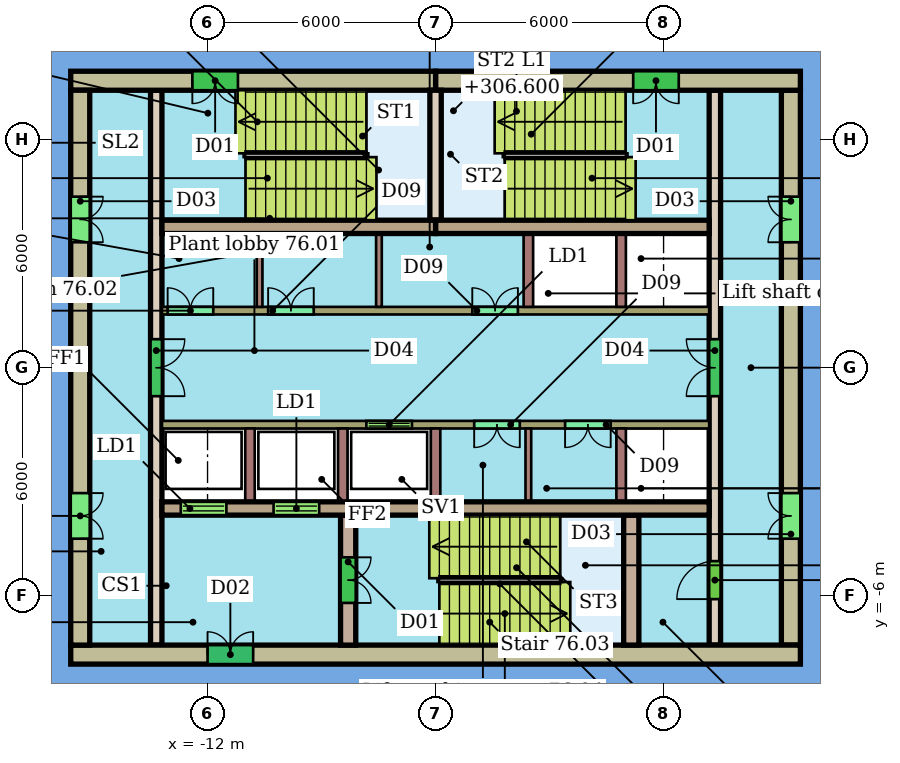
"""IFC4 building model, lengths in metres.
Left out: names, types, materials, properties, quantities, classifications, styles, units other than length and angle.
Written with IfcOpenShell. Run it as: python <this file> out.ifc"""

import sys

from ifc_helpers import new_model, si_unit, direction, frame, frame_2d, origin, place, context, subcontext, project, spatial, rectangle, extrude, element, fill, save


model = new_model("IFC4")
c1 = context("Model", 3, precision=1e-05, world=origin(), true_north=direction((0.0, 1.0)))
c2 = subcontext(c1, "Body", "Model", "MODEL_VIEW")
j1 = project(units=[si_unit("LENGTHUNIT", "METRE"), si_unit("PLANEANGLEUNIT", "RADIAN")], contexts=[c1])
p1 = place(None, origin())
s1 = spatial("IfcSite", under=j1, at=p1, CompositionType="ELEMENT")
p2 = place(p1, origin())
s2 = spatial("IfcBuilding", under=s1, at=p2, CompositionType="ELEMENT")
p3 = place(p2, frame((0.0, 0.0, 304.5)))
s3 = spatial("IfcBuildingStorey", under=s2, at=p3, CompositionType="ELEMENT", Elevation=304.5)
p4 = place(p3, frame((3.6, 7.55, 0.0), z_axis=(0.0, 0.0, 1.0), x_axis=(-1.0, 0.0, 0.0)))
e1 = element("IfcWall", 1, at=p4, inside=s3, PredefinedType="SHEAR", context=c2, shape_type="SweptSolid", body=[
    extrude(rectangle(XDim=9.6, YDim=0.5, at=frame_2d((4.8, 0.0))), origin(), (0.0, 0.0, 1.0), 3.9),
])
p5 = place(p4, frame((3.2, 0.0, 0.0)))
e2 = element("IfcOpeningElement", 2, at=p5, cuts=e1, PredefinedType="OPENING", context=c2, shape_type="SweptSolid", body=[
    extrude(rectangle(XDim=1.2, YDim=2.1, at=frame_2d((0.6, 1.05))), frame((0.0, 0.26, 0.0), z_axis=(0.0, -1.0, 0.0), x_axis=(1.0, 0.0, 0.0)), (0.0, 0.0, 1.0), 0.52),
])
p6 = place(p3, frame((-6.0, 7.55, 0.0), z_axis=(0.0, 0.0, 1.0), x_axis=(-1.0, 0.0, 0.0)))
e3 = element("IfcWall", 3, at=p6, inside=s3, PredefinedType="SHEAR", context=c2, shape_type="SweptSolid", body=[
    extrude(rectangle(XDim=9.6, YDim=0.5, at=frame_2d((4.8, 0.0))), origin(), (0.0, 0.0, 1.0), 3.9),
])
p7 = place(p6, frame((5.2, 0.0, 0.0)))
e4 = element("IfcOpeningElement", 4, at=p7, cuts=e3, PredefinedType="OPENING", context=c2, shape_type="SweptSolid", body=[
    extrude(rectangle(XDim=1.2, YDim=2.1, at=frame_2d((0.6, 1.05))), frame((0.0, 0.26, 0.0), z_axis=(0.0, -1.0, 0.0), x_axis=(1.0, 0.0, 0.0)), (0.0, 0.0, 1.0), 0.52),
])
p8 = place(p3, frame((-15.6, -7.55, 0.0), z_axis=(0.0, 0.0, 1.0), x_axis=(1.0, 0.0, 0.0)))
e5 = element("IfcWall", 5, at=p8, inside=s3, PredefinedType="SHEAR", context=c2, shape_type="SweptSolid", body=[
    extrude(rectangle(XDim=19.2, YDim=0.5, at=frame_2d((9.6, 0.0))), origin(), (0.0, 0.0, 1.0), 3.9),
])
p9 = place(p8, frame((3.6, 0.0, 0.0)))
e6 = element("IfcOpeningElement", 6, at=p9, cuts=e5, PredefinedType="OPENING", context=c2, shape_type="SweptSolid", body=[
    extrude(rectangle(XDim=1.2, YDim=2.1, at=frame_2d((0.6, 1.05))), frame((0.0, 0.26, 0.0), z_axis=(0.0, -1.0, 0.0), x_axis=(1.0, 0.0, 0.0)), (0.0, 0.0, 1.0), 0.52),
])
p10 = place(p3, frame((-15.35, 7.3, 0.0), z_axis=(0.0, 0.0, 1.0), x_axis=(0.0, -1.0, 0.0)))
e7 = element("IfcWall", 7, at=p10, inside=s3, PredefinedType="SHEAR", context=c2, shape_type="SweptSolid", body=[
    extrude(rectangle(XDim=14.6, YDim=0.5, at=frame_2d((7.3, 0.0))), origin(), (0.0, 0.0, 1.0), 3.9),
])
p11 = place(p10, frame((10.6, 0.0, 0.0)))
e8 = element("IfcOpeningElement", 8, at=p11, cuts=e7, PredefinedType="OPENING", context=c2, shape_type="SweptSolid", body=[
    extrude(rectangle(XDim=1.2, YDim=2.1, at=frame_2d((0.6, 1.05))), frame((0.0, 0.26, 0.0), z_axis=(0.0, -1.0, 0.0), x_axis=(1.0, 0.0, 0.0)), (0.0, 0.0, 1.0), 0.52),
])
p12 = place(p10, frame((2.8, 0.0, 0.0)))
e9 = element("IfcOpeningElement", 9, at=p12, cuts=e7, PredefinedType="OPENING", context=c2, shape_type="SweptSolid", body=[
    extrude(rectangle(XDim=1.2, YDim=2.1, at=frame_2d((0.6, 1.05))), frame((0.0, 0.26, 0.0), z_axis=(0.0, -1.0, 0.0), x_axis=(1.0, 0.0, 0.0)), (0.0, 0.0, 1.0), 0.52),
])
p13 = place(p3, frame((3.35, -7.3, 0.0), z_axis=(0.0, 0.0, 1.0), x_axis=(0.0, 1.0, 0.0)))
e10 = element("IfcWall", 10, at=p13, inside=s3, PredefinedType="SHEAR", context=c2, shape_type="SweptSolid", body=[
    extrude(rectangle(XDim=14.6, YDim=0.5, at=frame_2d((7.3, 0.0))), origin(), (0.0, 0.0, 1.0), 3.9),
])
p14 = place(p13, frame((2.8, 0.0, 0.0)))
e11 = element("IfcOpeningElement", 11, at=p14, cuts=e10, PredefinedType="OPENING", context=c2, shape_type="SweptSolid", body=[
    extrude(rectangle(XDim=1.2, YDim=2.1, at=frame_2d((0.6, 1.05))), frame((0.0, 0.26, 0.0), z_axis=(0.0, -1.0, 0.0), x_axis=(1.0, 0.0, 0.0)), (0.0, 0.0, 1.0), 0.52),
])
p15 = place(p13, frame((10.6, 0.0, 0.0)))
e12 = element("IfcOpeningElement", 12, at=p15, cuts=e10, PredefinedType="OPENING", context=c2, shape_type="SweptSolid", body=[
    extrude(rectangle(XDim=1.2, YDim=2.1, at=frame_2d((0.6, 1.05))), frame((0.0, 0.26, 0.0), z_axis=(0.0, -1.0, 0.0), x_axis=(1.0, 0.0, 0.0)), (0.0, 0.0, 1.0), 0.52),
])
for number, where, z_axis, x_axis in (
    (13, (-13.2, 3.705, 0.0), (0.0, 0.0, 1.0), (1.0, 0.0, 0.0)),
    (14, (-6.0, 3.705, 0.0), (0.0, 0.0, 1.0), (1.0, 0.0, 0.0)),
):
    element("IfcWall", number, at=place(p3, frame(where, z_axis=z_axis, x_axis=x_axis)), inside=s3, PredefinedType="SHEAR", context=c2, shape_type="SweptSolid", body=[
        extrude(rectangle(XDim=7.2, YDim=0.35, at=frame_2d((3.6, 0.0))), origin(), (0.0, 0.0, 1.0), 3.9),
    ])
p16 = place(p3, frame((-13.2, -3.705, 0.0), z_axis=(0.0, 0.0, 1.0), x_axis=(1.0, 0.0, 0.0)))
e15 = element("IfcWall", 15, at=p16, inside=s3, PredefinedType="SHEAR", context=c2, shape_type="SweptSolid", body=[
    extrude(rectangle(XDim=7.2, YDim=0.35, at=frame_2d((3.6, 0.0))), origin(), (0.0, 0.0, 1.0), 3.9),
])
p17 = place(p16, frame((0.496, 0.0, 0.0)))
e16 = element("IfcOpeningElement", 16, at=p17, cuts=e15, PredefinedType="OPENING", context=c2, shape_type="SweptSolid", body=[
    extrude(rectangle(XDim=1.2, YDim=2.1, at=frame_2d((0.6, 1.05))), frame((0.0, 0.185, 0.0), z_axis=(0.0, -1.0, 0.0), x_axis=(1.0, 0.0, 0.0)), (0.0, 0.0, 1.0), 0.37),
])
p18 = place(p16, frame((2.938, 0.0, 0.0)))
e17 = element("IfcOpeningElement", 17, at=p18, cuts=e15, PredefinedType="OPENING", context=c2, shape_type="SweptSolid", body=[
    extrude(rectangle(XDim=1.2, YDim=2.1, at=frame_2d((0.6, 1.05))), frame((0.0, 0.185, 0.0), z_axis=(0.0, -1.0, 0.0), x_axis=(1.0, 0.0, 0.0)), (0.0, 0.0, 1.0), 0.37),
])
p19 = place(p3, frame((-6.0, -3.705, 0.0), z_axis=(0.0, 0.0, 1.0), x_axis=(1.0, 0.0, 0.0)))
e18 = element("IfcWall", 18, at=p19, inside=s3, PredefinedType="SHEAR", context=c2, shape_type="SweptSolid", body=[
    extrude(rectangle(XDim=7.2, YDim=0.35, at=frame_2d((3.6, 0.0))), origin(), (0.0, 0.0, 1.0), 3.9),
])
p20 = place(p3, frame((-13.35, 7.3, 0.0), z_axis=(0.0, 0.0, 1.0), x_axis=(0.0, -1.0, 0.0)))
e19 = element("IfcWall", 19, at=p20, inside=s3, PredefinedType="SHEAR", context=c2, shape_type="SweptSolid", body=[
    extrude(rectangle(XDim=14.6, YDim=0.3, at=frame_2d((7.3, 0.0))), origin(), (0.0, 0.0, 1.0), 3.9),
])
p21 = place(p20, frame((6.55, 0.0, 0.0)))
e20 = element("IfcOpeningElement", 20, at=p21, cuts=e19, PredefinedType="OPENING", context=c2, shape_type="SweptSolid", body=[
    extrude(rectangle(XDim=1.5, YDim=2.1, at=frame_2d((0.75, 1.05))), frame((0.0, 0.16, 0.0), z_axis=(0.0, -1.0, 0.0), x_axis=(1.0, 0.0, 0.0)), (0.0, 0.0, 1.0), 0.32),
])
p22 = place(p3, frame((1.35, -7.3, 0.0), z_axis=(0.0, 0.0, 1.0), x_axis=(0.0, 1.0, 0.0)))
e21 = element("IfcWall", 21, at=p22, inside=s3, PredefinedType="SHEAR", context=c2, shape_type="SweptSolid", body=[
    extrude(rectangle(XDim=14.6, YDim=0.3, at=frame_2d((7.3, 0.0))), origin(), (0.0, 0.0, 1.0), 3.9),
])
p23 = place(p22, frame((1.21, 0.0, 0.0)))
e22 = element("IfcOpeningElement", 22, at=p23, cuts=e21, PredefinedType="OPENING", context=c2, shape_type="SweptSolid", body=[
    extrude(rectangle(XDim=1.0, YDim=2.1, at=frame_2d((0.5, 1.05))), frame((0.0, 0.16, 0.0), z_axis=(0.0, -1.0, 0.0), x_axis=(1.0, 0.0, 0.0)), (0.0, 0.0, 1.0), 0.32),
])
p24 = place(p22, frame((6.55, 0.0, 0.0)))
e23 = element("IfcOpeningElement", 23, at=p24, cuts=e21, PredefinedType="OPENING", context=c2, shape_type="SweptSolid", body=[
    extrude(rectangle(XDim=1.5, YDim=2.1, at=frame_2d((0.75, 1.05))), frame((0.0, 0.16, 0.0), z_axis=(0.0, -1.0, 0.0), x_axis=(1.0, 0.0, 0.0)), (0.0, 0.0, 1.0), 0.32),
])
p25 = place(p3, frame((-13.2, 1.5, 0.0), z_axis=(0.0, 0.0, 1.0), x_axis=(1.0, 0.0, 0.0)))
e24 = element("IfcWall", 24, at=p25, inside=s3, PredefinedType="SHEAR", context=c2, shape_type="SweptSolid", body=[
    extrude(rectangle(XDim=14.4, YDim=0.2, at=frame_2d((7.2, 0.0))), origin(), (0.0, 0.0, 1.0), 3.9),
])
p26 = place(p25, frame((0.15, 0.0, 0.0)))
e25 = element("IfcOpeningElement", 25, at=p26, cuts=e24, PredefinedType="OPENING", context=c2, shape_type="SweptSolid", body=[
    extrude(rectangle(XDim=1.2, YDim=2.4, at=frame_2d((0.6, 1.2))), frame((0.0, 0.11, 0.0), z_axis=(0.0, -1.0, 0.0), x_axis=(1.0, 0.0, 0.0)), (0.0, 0.0, 1.0), 0.22),
])
p27 = place(p25, frame((2.794, 0.0, 0.0)))
e26 = element("IfcOpeningElement", 26, at=p27, cuts=e24, PredefinedType="OPENING", context=c2, shape_type="SweptSolid", body=[
    extrude(rectangle(XDim=1.2, YDim=2.4, at=frame_2d((0.6, 1.2))), frame((0.0, 0.11, 0.0), z_axis=(0.0, -1.0, 0.0), x_axis=(1.0, 0.0, 0.0)), (0.0, 0.0, 1.0), 0.22),
])
p28 = place(p25, frame((8.167, 0.0, 0.0)))
e27 = element("IfcOpeningElement", 27, at=p28, cuts=e24, PredefinedType="OPENING", context=c2, shape_type="SweptSolid", body=[
    extrude(rectangle(XDim=1.2, YDim=2.4, at=frame_2d((0.6, 1.2))), frame((0.0, 0.11, 0.0), z_axis=(0.0, -1.0, 0.0), x_axis=(1.0, 0.0, 0.0)), (0.0, 0.0, 1.0), 0.22),
])
p29 = place(p3, frame((1.2, -1.5, 0.0), z_axis=(0.0, 0.0, 1.0), x_axis=(-1.0, 0.0, 0.0)))
e28 = element("IfcWall", 28, at=p29, inside=s3, PredefinedType="SHEAR", context=c2, shape_type="SweptSolid", body=[
    extrude(rectangle(XDim=14.4, YDim=0.2, at=frame_2d((7.2, 0.0))), origin(), (0.0, 0.0, 1.0), 3.9),
])
p30 = place(p29, frame((7.821, 0.0, 0.0)))
e29 = element("IfcOpeningElement", 29, at=p30, cuts=e28, PredefinedType="OPENING", context=c2, shape_type="SweptSolid", body=[
    extrude(rectangle(XDim=1.2, YDim=2.1, at=frame_2d((0.6, 1.05))), frame((0.0, 0.11, 0.0), z_axis=(0.0, -1.0, 0.0), x_axis=(1.0, 0.0, 0.0)), (0.0, 0.0, 1.0), 0.22),
])
p31 = place(p29, frame((4.983, 0.0, 0.0)))
e30 = element("IfcOpeningElement", 30, at=p31, cuts=e28, PredefinedType="OPENING", context=c2, shape_type="SweptSolid", body=[
    extrude(rectangle(XDim=1.2, YDim=2.4, at=frame_2d((0.6, 1.2))), frame((0.0, 0.11, 0.0), z_axis=(0.0, -1.0, 0.0), x_axis=(1.0, 0.0, 0.0)), (0.0, 0.0, 1.0), 0.22),
])
p32 = place(p29, frame((2.592, 0.0, 0.0)))
e31 = element("IfcOpeningElement", 31, at=p32, cuts=e28, PredefinedType="OPENING", context=c2, shape_type="SweptSolid", body=[
    extrude(rectangle(XDim=1.2, YDim=2.4, at=frame_2d((0.6, 1.2))), frame((0.0, 0.11, 0.0), z_axis=(0.0, -1.0, 0.0), x_axis=(1.0, 0.0, 0.0)), (0.0, 0.0, 1.0), 0.22),
])
p33 = place(p3, frame((-8.3, -3.88, 0.0), z_axis=(0.0, 0.0, 1.0), x_axis=(0.0, -1.0, 0.0)))
e32 = element("IfcWall", 32, at=p33, inside=s3, PredefinedType="SHEAR", context=c2, shape_type="SweptSolid", body=[
    extrude(rectangle(XDim=3.42, YDim=0.4, at=frame_2d((1.71, 0.0))), origin(), (0.0, 0.0, 1.0), 3.9),
])
p34 = place(p33, frame((1.11, 0.0, 0.0)))
e33 = element("IfcOpeningElement", 33, at=p34, cuts=e32, PredefinedType="OPENING", context=c2, shape_type="SweptSolid", body=[
    extrude(rectangle(XDim=1.2, YDim=2.1, at=frame_2d((0.6, 1.05))), frame((0.0, 0.21, 0.0), z_axis=(0.0, -1.0, 0.0), x_axis=(1.0, 0.0, 0.0)), (0.0, 0.0, 1.0), 0.42),
])
p35 = place(p3, frame((-0.85, -3.88, 0.0), z_axis=(0.0, 0.0, 1.0), x_axis=(0.0, -1.0, 0.0)))
e34 = element("IfcWall", 34, at=p35, inside=s3, PredefinedType="SHEAR", context=c2, shape_type="SweptSolid", body=[
    extrude(rectangle(XDim=3.42, YDim=0.4, at=frame_2d((1.71, 0.0))), origin(), (0.0, 0.0, 1.0), 3.9),
])
p36 = place(p3, frame((-6.0, 3.88, 0.0), z_axis=(0.0, 0.0, 1.0), x_axis=(0.0, 1.0, 0.0)))
e35 = element("IfcWall", 35, at=p36, inside=s3, PredefinedType="SHEAR", context=c2, shape_type="SweptSolid", body=[
    extrude(rectangle(XDim=3.42, YDim=0.3, at=frame_2d((1.71, 0.0))), origin(), (0.0, 0.0, 1.0), 3.9),
])
for number, where, z_axis, x_axis in (
    (36, (-3.558, 1.6, 0.0), (0.0, 0.0, 1.0), (0.0, 1.0, 0.0)),
    (37, (-1.117, 1.6, 0.0), (0.0, 0.0, 1.0), (0.0, 1.0, 0.0)),
):
    element("IfcWall", number, at=place(p3, frame(where, z_axis=z_axis, x_axis=x_axis)), inside=s3, PredefinedType="SHEAR", context=c2, shape_type="SweptSolid", body=[
        extrude(rectangle(XDim=1.93, YDim=0.25, at=frame_2d((0.965, 0.0))), origin(), (0.0, 0.0, 1.0), 3.9),
    ])
for number, where, z_axis, x_axis in (
    (38, (-10.631, 1.6, 0.0), (0.0, 0.0, 1.0), (0.0, 1.0, 0.0)),
    (39, (-7.49, 1.6, 0.0), (0.0, 0.0, 1.0), (0.0, 1.0, 0.0)),
):
    element("IfcWall", number, at=place(p3, frame(where, z_axis=z_axis, x_axis=x_axis)), inside=s3, PredefinedType="PARTITIONING", context=c2, shape_type="SweptSolid", body=[
        extrude(rectangle(XDim=1.93, YDim=0.15, at=frame_2d((0.965, 0.0))), origin(), (0.0, 0.0, 1.0), 3.9),
    ])
for number, where, z_axis, x_axis in (
    (40, (-10.883, -1.6, 0.0), (0.0, 0.0, 1.0), (0.0, -1.0, 0.0)),
    (41, (-8.442, -1.6, 0.0), (0.0, 0.0, 1.0), (0.0, -1.0, 0.0)),
    (42, (-6.0, -1.6, 0.0), (0.0, 0.0, 1.0), (0.0, -1.0, 0.0)),
    (43, (-1.117, -1.6, 0.0), (0.0, 0.0, 1.0), (0.0, -1.0, 0.0)),
):
    element("IfcWall", number, at=place(p3, frame(where, z_axis=z_axis, x_axis=x_axis)), inside=s3, PredefinedType="SHEAR", context=c2, shape_type="SweptSolid", body=[
        extrude(rectangle(XDim=1.93, YDim=0.25, at=frame_2d((0.965, 0.0))), origin(), (0.0, 0.0, 1.0), 3.9),
    ])
p37 = place(p3, frame((-3.558, -1.6, 0.0), z_axis=(0.0, 0.0, 1.0), x_axis=(0.0, -1.0, 0.0)))
e44 = element("IfcWall", 44, at=p37, inside=s3, PredefinedType="PARTITIONING", context=c2, shape_type="SweptSolid", body=[
    extrude(rectangle(XDim=1.93, YDim=0.15, at=frame_2d((0.965, 0.0))), origin(), (0.0, 0.0, 1.0), 3.9),
])
p38 = place(p5, origin())
e45 = element("IfcDoor", 45, at=p38, inside=s3, OperationType="DOUBLE_DOOR_SINGLE_SWING", PredefinedType="NOTDEFINED", context=c2, shape_type="SweptSolid", body=[
    extrude(rectangle(XDim=1.2, YDim=2.1, at=frame_2d((0.6, 1.05))), frame((0.0, 0.025, 0.0), z_axis=(0.0, -1.0, 0.0), x_axis=(1.0, 0.0, 0.0)), (0.0, 0.0, 1.0), 0.05),
])
fill(e2, e45)
p39 = place(p7, origin())
e46 = element("IfcDoor", 46, at=p39, inside=s3, OperationType="DOUBLE_DOOR_SINGLE_SWING", PredefinedType="NOTDEFINED", context=c2, shape_type="SweptSolid", body=[
    extrude(rectangle(XDim=1.2, YDim=2.1, at=frame_2d((0.6, 1.05))), frame((0.0, 0.025, 0.0), z_axis=(0.0, -1.0, 0.0), x_axis=(1.0, 0.0, 0.0)), (0.0, 0.0, 1.0), 0.05),
])
fill(e4, e46)
p40 = place(p9, origin())
e47 = element("IfcDoor", 47, at=p40, inside=s3, OperationType="DOUBLE_DOOR_SINGLE_SWING", PredefinedType="NOTDEFINED", context=c2, shape_type="SweptSolid", body=[
    extrude(rectangle(XDim=1.2, YDim=2.1, at=frame_2d((0.6, 1.05))), frame((0.0, 0.025, 0.0), z_axis=(0.0, -1.0, 0.0), x_axis=(1.0, 0.0, 0.0)), (0.0, 0.0, 1.0), 0.05),
])
fill(e6, e47)
p41 = place(p11, origin())
e48 = element("IfcDoor", 48, at=p41, inside=s3, OperationType="DOUBLE_DOOR_SINGLE_SWING", PredefinedType="NOTDEFINED", context=c2, shape_type="SweptSolid", body=[
    extrude(rectangle(XDim=1.2, YDim=2.1, at=frame_2d((0.6, 1.05))), frame((0.0, 0.025, 0.0), z_axis=(0.0, -1.0, 0.0), x_axis=(1.0, 0.0, 0.0)), (0.0, 0.0, 1.0), 0.05),
])
fill(e8, e48)
p42 = place(p12, origin())
e49 = element("IfcDoor", 49, at=p42, inside=s3, OperationType="DOUBLE_DOOR_SINGLE_SWING", PredefinedType="NOTDEFINED", context=c2, shape_type="SweptSolid", body=[
    extrude(rectangle(XDim=1.2, YDim=2.1, at=frame_2d((0.6, 1.05))), frame((0.0, 0.025, 0.0), z_axis=(0.0, -1.0, 0.0), x_axis=(1.0, 0.0, 0.0)), (0.0, 0.0, 1.0), 0.05),
])
fill(e9, e49)
p43 = place(p14, origin())
e50 = element("IfcDoor", 50, at=p43, inside=s3, OperationType="DOUBLE_DOOR_SINGLE_SWING", PredefinedType="NOTDEFINED", context=c2, shape_type="SweptSolid", body=[
    extrude(rectangle(XDim=1.2, YDim=2.1, at=frame_2d((0.6, 1.05))), frame((0.0, 0.025, 0.0), z_axis=(0.0, -1.0, 0.0), x_axis=(1.0, 0.0, 0.0)), (0.0, 0.0, 1.0), 0.05),
])
fill(e11, e50)
p44 = place(p15, origin())
e51 = element("IfcDoor", 51, at=p44, inside=s3, OperationType="DOUBLE_DOOR_SINGLE_SWING", PredefinedType="NOTDEFINED", context=c2, shape_type="SweptSolid", body=[
    extrude(rectangle(XDim=1.2, YDim=2.1, at=frame_2d((0.6, 1.05))), frame((0.0, 0.025, 0.0), z_axis=(0.0, -1.0, 0.0), x_axis=(1.0, 0.0, 0.0)), (0.0, 0.0, 1.0), 0.05),
])
fill(e12, e51)
p45 = place(p17, origin())
e52 = element("IfcDoor", 52, at=p45, inside=s3, OperationType="DOUBLE_DOOR_SLIDING", PredefinedType="NOTDEFINED", context=c2, shape_type="SweptSolid", body=[
    extrude(rectangle(XDim=1.2, YDim=2.1, at=frame_2d((0.6, 1.05))), frame((0.0, 0.025, 0.0), z_axis=(0.0, -1.0, 0.0), x_axis=(1.0, 0.0, 0.0)), (0.0, 0.0, 1.0), 0.05),
])
fill(e16, e52)
p46 = place(p18, origin())
e53 = element("IfcDoor", 53, at=p46, inside=s3, OperationType="DOUBLE_DOOR_SLIDING", PredefinedType="NOTDEFINED", context=c2, shape_type="SweptSolid", body=[
    extrude(rectangle(XDim=1.2, YDim=2.1, at=frame_2d((0.6, 1.05))), frame((0.0, 0.025, 0.0), z_axis=(0.0, -1.0, 0.0), x_axis=(1.0, 0.0, 0.0)), (0.0, 0.0, 1.0), 0.05),
])
fill(e17, e53)
p47 = place(p21, origin())
e54 = element("IfcDoor", 54, at=p47, inside=s3, OperationType="DOUBLE_DOOR_SINGLE_SWING", PredefinedType="NOTDEFINED", context=c2, shape_type="SweptSolid", body=[
    extrude(rectangle(XDim=1.5, YDim=2.1, at=frame_2d((0.75, 1.05))), frame((0.0, 0.025, 0.0), z_axis=(0.0, -1.0, 0.0), x_axis=(1.0, 0.0, 0.0)), (0.0, 0.0, 1.0), 0.05),
])
fill(e20, e54)
p48 = place(p23, origin())
e55 = element("IfcDoor", 55, at=p48, inside=s3, OperationType="SINGLE_SWING_LEFT", PredefinedType="NOTDEFINED", context=c2, shape_type="SweptSolid", body=[
    extrude(rectangle(XDim=1.0, YDim=2.1, at=frame_2d((0.5, 1.05))), frame((0.0, 0.025, 0.0), z_axis=(0.0, -1.0, 0.0), x_axis=(1.0, 0.0, 0.0)), (0.0, 0.0, 1.0), 0.05),
])
fill(e22, e55)
p49 = place(p24, origin())
e56 = element("IfcDoor", 56, at=p49, inside=s3, OperationType="DOUBLE_DOOR_SINGLE_SWING", PredefinedType="NOTDEFINED", context=c2, shape_type="SweptSolid", body=[
    extrude(rectangle(XDim=1.5, YDim=2.1, at=frame_2d((0.75, 1.05))), frame((0.0, 0.025, 0.0), z_axis=(0.0, -1.0, 0.0), x_axis=(1.0, 0.0, 0.0)), (0.0, 0.0, 1.0), 0.05),
])
fill(e23, e56)
p50 = place(p26, origin())
e57 = element("IfcDoor", 57, at=p50, inside=s3, OperationType="DOUBLE_DOOR_SINGLE_SWING", PredefinedType="NOTDEFINED", context=c2, shape_type="SweptSolid", body=[
    extrude(rectangle(XDim=1.2, YDim=2.4, at=frame_2d((0.6, 1.2))), frame((0.0, 0.025, 0.0), z_axis=(0.0, -1.0, 0.0), x_axis=(1.0, 0.0, 0.0)), (0.0, 0.0, 1.0), 0.05),
])
fill(e25, e57)
p51 = place(p27, origin())
e58 = element("IfcDoor", 58, at=p51, inside=s3, OperationType="DOUBLE_DOOR_SINGLE_SWING", PredefinedType="NOTDEFINED", context=c2, shape_type="SweptSolid", body=[
    extrude(rectangle(XDim=1.2, YDim=2.4, at=frame_2d((0.6, 1.2))), frame((0.0, 0.025, 0.0), z_axis=(0.0, -1.0, 0.0), x_axis=(1.0, 0.0, 0.0)), (0.0, 0.0, 1.0), 0.05),
])
fill(e26, e58)
p52 = place(p28, origin())
e59 = element("IfcDoor", 59, at=p52, inside=s3, OperationType="DOUBLE_DOOR_SINGLE_SWING", PredefinedType="NOTDEFINED", context=c2, shape_type="SweptSolid", body=[
    extrude(rectangle(XDim=1.2, YDim=2.4, at=frame_2d((0.6, 1.2))), frame((0.0, 0.025, 0.0), z_axis=(0.0, -1.0, 0.0), x_axis=(1.0, 0.0, 0.0)), (0.0, 0.0, 1.0), 0.05),
])
fill(e27, e59)
p53 = place(p30, origin())
e60 = element("IfcDoor", 60, at=p53, inside=s3, OperationType="DOUBLE_DOOR_SLIDING", PredefinedType="NOTDEFINED", context=c2, shape_type="SweptSolid", body=[
    extrude(rectangle(XDim=1.2, YDim=2.1, at=frame_2d((0.6, 1.05))), frame((0.0, 0.025, 0.0), z_axis=(0.0, -1.0, 0.0), x_axis=(1.0, 0.0, 0.0)), (0.0, 0.0, 1.0), 0.05),
])
fill(e29, e60)
p54 = place(p31, origin())
e61 = element("IfcDoor", 61, at=p54, inside=s3, OperationType="DOUBLE_DOOR_SINGLE_SWING", PredefinedType="NOTDEFINED", context=c2, shape_type="SweptSolid", body=[
    extrude(rectangle(XDim=1.2, YDim=2.4, at=frame_2d((0.6, 1.2))), frame((0.0, 0.025, 0.0), z_axis=(0.0, -1.0, 0.0), x_axis=(1.0, 0.0, 0.0)), (0.0, 0.0, 1.0), 0.05),
])
fill(e30, e61)
p55 = place(p32, origin())
e62 = element("IfcDoor", 62, at=p55, inside=s3, OperationType="DOUBLE_DOOR_SINGLE_SWING", PredefinedType="NOTDEFINED", context=c2, shape_type="SweptSolid", body=[
    extrude(rectangle(XDim=1.2, YDim=2.4, at=frame_2d((0.6, 1.2))), frame((0.0, 0.025, 0.0), z_axis=(0.0, -1.0, 0.0), x_axis=(1.0, 0.0, 0.0)), (0.0, 0.0, 1.0), 0.05),
])
fill(e31, e62)
p56 = place(p34, origin())
e63 = element("IfcDoor", 63, at=p56, inside=s3, OperationType="DOUBLE_DOOR_SINGLE_SWING", PredefinedType="NOTDEFINED", context=c2, shape_type="SweptSolid", body=[
    extrude(rectangle(XDim=1.2, YDim=2.1, at=frame_2d((0.6, 1.05))), frame((0.0, 0.025, 0.0), z_axis=(0.0, -1.0, 0.0), x_axis=(1.0, 0.0, 0.0)), (0.0, 0.0, 1.0), 0.05),
])
fill(e33, e63)
save(model, sys.argv[1])
